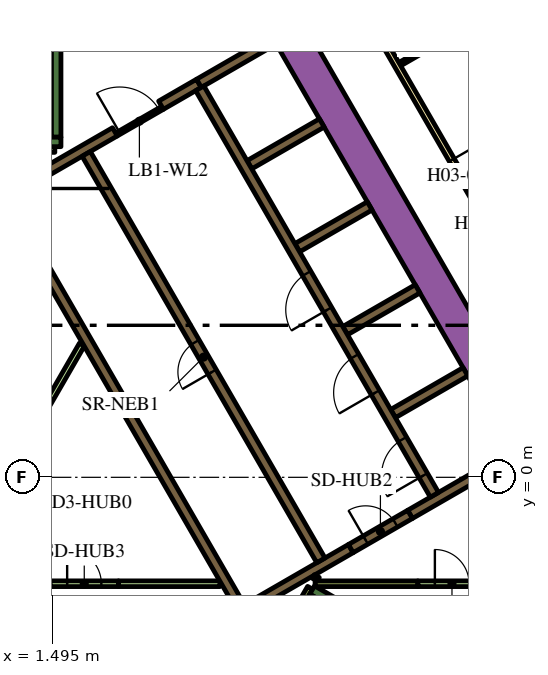
"""IFC4 building model, lengths in metres.
Left out: names, types, materials, properties, quantities, classifications, styles, units other than length and angle.
Written with IfcOpenShell. Run it as: python <this file> out.ifc"""

import sys

from ifc_helpers import new_model, si_unit, direction, frame, frame_2d, origin, place, context, subcontext, project, spatial, polyline, rectangle, outline, extrude, element, fill, save


model = new_model("IFC4")
c1 = context("Model", 3, precision=1e-05, world=origin(), true_north=direction((0.0, 1.0)))
c2 = subcontext(c1, "Body", "Model", "MODEL_VIEW")
j1 = project(units=[si_unit("LENGTHUNIT", "METRE"), si_unit("PLANEANGLEUNIT", "RADIAN")], contexts=[c1])
p1 = place(None, origin())
s1 = spatial("IfcSite", under=j1, at=p1, CompositionType="ELEMENT")
p2 = place(p1, origin())
s2 = spatial("IfcBuilding", under=s1, at=p2, CompositionType="ELEMENT")
p3 = place(p2, frame((0.0, 0.0, 58.8)))
s3 = spatial("IfcBuildingStorey", under=s2, at=p3, CompositionType="ELEMENT", Elevation=58.8)
p4 = place(p3, frame((6.776, 13.364, 0.0), z_axis=(0.0, 0.0, 1.0), x_axis=(0.500004177138, -0.8660229921, 0.0)))
e1 = element("IfcWall", 1, at=p4, inside=s3, PredefinedType="SOLIDWALL", context=c2, shape_type="SweptSolid", body=[
    extrude(rectangle(XDim=20.204, YDim=0.9, at=frame_2d((10.102, 0.0))), origin(), (0.0, 0.0, 1.0), 3.9),
])
p5 = place(p3, frame((8.334, -2.964, 0.0), z_axis=(0.0, 0.0, 1.0), x_axis=(0.866016039709, -0.500016218704, 0.0)))
e2 = element("IfcWall", 2, at=p5, inside=s3, PredefinedType="SOLIDWALL", context=c2, shape_type="SweptSolid", body=[
    extrude(rectangle(XDim=7.05, YDim=0.25, at=frame_2d((3.525, 0.0))), origin(), (0.0, 0.0, 1.0), 3.9),
])
p6 = place(p3, frame((8.163, -3.511, 0.0), z_axis=(0.0, 0.0, 1.0), x_axis=(0.500127794843, 0.865951608824, 0.0)))
e3 = element("IfcWall", 3, at=p6, inside=s3, PredefinedType="SOLIDWALL", context=c2, shape_type="SweptSolid", body=[
    extrude(rectangle(XDim=0.435, YDim=0.25, at=frame_2d((0.217, 0.0))), origin(), (0.0, 0.0, 1.0), 3.9),
])
p7 = place(p3, frame((1.6, 8.95, 0.0), z_axis=(0.0, 0.0, 1.0), x_axis=(0.0, 1.0, 0.0)))
e4 = element("IfcWall", 4, at=p7, inside=s3, PredefinedType="SOLIDWALL", context=c2, shape_type="SweptSolid", body=[
    extrude(rectangle(XDim=6.8, YDim=0.25, at=frame_2d((3.4, 0.0))), origin(), (0.0, 0.0, 1.0), 3.9),
])
p8 = place(p3, frame((1.05, 8.825, 0.0), z_axis=(0.0, 0.0, 1.0), x_axis=(1.0, 0.0, 0.0)))
e5 = element("IfcWall", 5, at=p8, inside=s3, PredefinedType="SOLIDWALL", context=c2, shape_type="SweptSolid", body=[
    extrude(rectangle(XDim=0.675, YDim=0.25, at=frame_2d((0.337, 0.0))), origin(), (0.0, 0.0, 1.0), 3.9),
])
p9 = place(p3, frame((10.464, 1.677, 0.0), z_axis=(0.0, 0.0, 1.0), x_axis=(0.86605622881, 0.499946605688, 0.0)))
e6 = element("IfcWall", 6, at=p9, inside=s3, PredefinedType="SOLIDWALL", context=c2, shape_type="SweptSolid", body=[
    extrude(rectangle(XDim=2.2, YDim=0.25, at=frame_2d((1.1, 0.0))), origin(), (0.0, 0.0, 1.0), 3.9),
])
p10 = place(p3, origin())
e7 = element("IfcWall", 7, at=p10, inside=s3, PredefinedType="SOLIDWALL", context=c2, shape_type="SweptSolid", body=[
    extrude(outline(polyline([(0.335, 6.925), (0.335, 6.925), (0.335, 7.075), (0.335, 7.075), (0.335, 7.075), (0.245, 7.075), (0.079, 7.363), (0.035, 7.439), (0.252, 7.564), (0.377, 7.348), (6.552, -3.348), (6.677, -3.564), (6.46, -3.689), (4.897, -0.981), (0.332, 6.925), (0.335, 6.925), (0.335, 6.925)])), origin(), (0.0, 0.0, 1.0), 3.9),
])
p11 = place(p3, frame((4.358, 9.791, 0.0), z_axis=(0.0, 0.0, 1.0), x_axis=(0.866079547155, 0.499906209203, 0.0)))
e8 = element("IfcWall", 8, at=p11, inside=s3, PredefinedType="SOLIDWALL", context=c2, shape_type="SweptSolid", body=[
    extrude(rectangle(XDim=1.15, YDim=0.25, at=frame_2d((0.575, 0.0))), origin(), (0.0, 0.0, 1.0), 3.9),
])
p12 = place(p3, frame((5.356, 10.367, 0.0), z_axis=(0.0, 0.0, 1.0), x_axis=(0.865978535641, 0.50008116922, 0.0)))
e9 = element("IfcWall", 9, at=p12, inside=s3, PredefinedType="SOLIDWALL", context=c2, shape_type="SweptSolid", body=[
    extrude(rectangle(XDim=2.278, YDim=0.25, at=frame_2d((1.139, 0.0))), origin(), (0.0, 0.0, 1.0), 3.9),
])
p13 = place(p3, frame((0.314, 7.456, 0.0), z_axis=(0.0, 0.0, 1.0), x_axis=(0.866013897511, 0.50001992892, 0.0)))
e10 = element("IfcWall", 10, at=p13, inside=s3, PredefinedType="SOLIDWALL", context=c2, shape_type="SweptSolid", body=[
    extrude(rectangle(XDim=3.268, YDim=0.25, at=frame_2d((1.634, 0.0))), origin(), (0.0, 0.0, 1.0), 3.9),
])
p14 = place(p3, frame((9.352, -1.875, 0.0), z_axis=(0.0, 0.0, 1.0), x_axis=(-0.866024844342, -0.500000968981, 0.0)))
e11 = element("IfcWall", 11, at=p14, inside=s3, PredefinedType="SOLIDWALL", context=c2, shape_type="SweptSolid", body=[
    extrude(rectangle(XDim=3.162, YDim=0.25, at=frame_2d((1.581, 0.0))), origin(), (0.0, 0.0, 1.0), 3.9),
])
for number, where, z_axis, x_axis in (
    (12, (6.684, 8.224, 0.0), (0.0, 0.0, 1.0), (0.866, 0.5, 0.0)),
    (13, (7.944, 6.041, 0.0), (0.0, 0.0, 1.0), (0.866, 0.5, 0.0)),
    (14, (9.204, 3.859, 0.0), (0.0, 0.0, 1.0), (0.866, 0.5, 0.0)),
):
    element("IfcWall", number, at=place(p3, frame(where, z_axis=z_axis, x_axis=x_axis)), inside=s3, PredefinedType="SOLIDWALL", context=c2, shape_type="SweptSolid", body=[
        extrude(rectangle(XDim=2.2, YDim=0.25, at=frame_2d((1.1, 0.0))), origin(), (0.0, 0.0, 1.0), 3.9),
    ])
p15 = place(p3, frame((10.911, -0.975, 0.0), z_axis=(0.0, 0.0, 1.0), x_axis=(0.866046979468, 0.499962627957, 0.0)))
e15 = element("IfcWall", 15, at=p15, inside=s3, PredefinedType="SOLIDWALL", context=c2, shape_type="SweptSolid", body=[
    extrude(rectangle(XDim=3.138, YDim=0.25, at=frame_2d((1.569, 0.0))), origin(), (0.0, 0.0, 1.0), 3.9),
])
p16 = place(p3, frame((8.412, -2.8, 0.0), z_axis=(0.0, 0.0, 1.0), x_axis=(1.0, 0.0, 0.0)))
e16 = element("IfcWall", 16, at=p16, inside=s3, PredefinedType="PARTITIONING", context=c2, shape_type="SweptSolid", body=[
    extrude(rectangle(XDim=2.702, YDim=0.15, at=frame_2d((1.351, 0.0))), origin(), (0.0, 0.0, 1.0), 3.9),
])
p17 = place(p3, frame((8.459, -2.599, 0.0), z_axis=(0.0, 0.0, 1.0), x_axis=(-0.501919277433, -0.864914469148, 0.0)))
e17 = element("IfcWall", 17, at=p17, inside=s3, PredefinedType="PARTITIONING", context=c2, shape_type="SweptSolid", body=[
    extrude(rectangle(XDim=0.109, YDim=0.15, at=frame_2d((0.054, 0.0))), origin(), (0.0, 0.0, 1.0), 3.9),
])
p18 = place(p3, frame((8.281, -2.907, 0.0), z_axis=(0.0, 0.0, 1.0), x_axis=(-0.500193841991, -0.86591346013, 0.0)))
e18 = element("IfcWall", 18, at=p18, inside=s3, PredefinedType="PARTITIONING", context=c2, shape_type="SweptSolid", body=[
    extrude(rectangle(XDim=0.583, YDim=0.15, at=frame_2d((0.292, 0.0))), origin(), (0.0, 0.0, 1.0), 3.9),
])
p19 = place(p3, frame((3.238, -2.8, 0.0), z_axis=(0.0, 0.0, 1.0), x_axis=(1.0, 0.0, 0.0)))
e19 = element("IfcWall", 19, at=p19, inside=s3, PredefinedType="PARTITIONING", context=c2, shape_type="SweptSolid", body=[
    extrude(rectangle(XDim=2.672, YDim=0.15, at=frame_2d((1.336, 0.0))), origin(), (0.0, 0.0, 1.0), 2.75),
])
p20 = place(p3, frame((1.016, 1.309, 0.0), z_axis=(0.0, 0.0, 1.0), x_axis=(0.49998231768, 0.866035612436, 0.0)))
e20 = element("IfcWall", 20, at=p20, inside=s3, PredefinedType="PARTITIONING", context=c2, shape_type="SweptSolid", body=[
    extrude(rectangle(XDim=2.521, YDim=0.15, at=frame_2d((1.26, 0.0))), origin(), (0.0, 0.0, 1.0), 2.75),
])
p21 = place(p3, frame((1.05, 8.625, 0.0), z_axis=(0.0, 0.0, 1.0), x_axis=(1.0, 0.0, 0.0)))
e21 = element("IfcWall", 21, at=p21, inside=s3, PredefinedType="PARTITIONING", context=c2, shape_type="SweptSolid", body=[
    extrude(rectangle(XDim=0.514, YDim=0.15, at=frame_2d((0.257, 0.0))), origin(), (0.0, 0.0, 1.0), 2.75),
])
p22 = place(p3, frame((11.553, -0.46, 0.0), z_axis=(0.0, 0.0, 1.0), x_axis=(-0.500006514828, 0.866021642414, 0.0)))
e22 = element("IfcWall", 22, at=p22, inside=s3, PredefinedType="SOLIDWALL", context=c2, shape_type="SweptSolid", body=[
    extrude(rectangle(XDim=12.35, YDim=0.25, at=frame_2d((6.175, 0.0))), origin(), (0.0, 0.0, 1.0), 3.9),
])
p23 = place(p22, frame((0.585, 0.0, 0.0)))
e23 = element("IfcOpeningElement", 23, at=p23, cuts=e22, PredefinedType="OPENING", context=c2, shape_type="SweptSolid", body=[
    extrude(rectangle(XDim=1.1, YDim=2.1, at=frame_2d((0.55, 1.05))), frame((0.0, 0.135, 0.0), z_axis=(0.0, -1.0, 0.0), x_axis=(1.0, 0.0, 0.0)), (0.0, 0.0, 1.0), 0.27),
])
p24 = place(p22, frame((3.105, 0.0, 0.0)))
e24 = element("IfcOpeningElement", 24, at=p24, cuts=e22, PredefinedType="OPENING", context=c2, shape_type="SweptSolid", body=[
    extrude(rectangle(XDim=1.1, YDim=2.1, at=frame_2d((0.55, 1.05))), frame((0.0, 0.135, 0.0), z_axis=(0.0, -1.0, 0.0), x_axis=(1.0, 0.0, 0.0)), (0.0, 0.0, 1.0), 0.27),
])
p25 = place(p22, frame((5.625, 0.0, 0.0)))
e25 = element("IfcOpeningElement", 25, at=p25, cuts=e22, PredefinedType="OPENING", context=c2, shape_type="SweptSolid", body=[
    extrude(rectangle(XDim=1.1, YDim=2.1, at=frame_2d((0.55, 1.05))), frame((0.0, 0.135, 0.0), z_axis=(0.0, -1.0, 0.0), x_axis=(1.0, 0.0, 0.0)), (0.0, 0.0, 1.0), 0.27),
])
p26 = place(p3, frame((8.565, -2.185, 0.0), z_axis=(0.0, 0.0, 1.0), x_axis=(-0.499997954832, 0.866026584559, 0.0)))
e26 = element("IfcWall", 26, at=p26, inside=s3, PredefinedType="SOLIDWALL", context=c2, shape_type="SweptSolid", body=[
    extrude(rectangle(XDim=12.35, YDim=0.25, at=frame_2d((6.175, 0.0))), origin(), (0.0, 0.0, 1.0), 3.9),
])
p27 = place(p26, frame((5.725, 0.0, 0.0)))
e27 = element("IfcOpeningElement", 27, at=p27, cuts=e26, PredefinedType="OPENING", context=c2, shape_type="SweptSolid", body=[
    extrude(rectangle(XDim=0.9, YDim=2.1, at=frame_2d((0.45, 1.05))), frame((0.0, 0.135, 0.0), z_axis=(0.0, -1.0, 0.0), x_axis=(1.0, 0.0, 0.0)), (0.0, 0.0, 1.0), 0.27),
])
p28 = place(p3, frame((3.183, 9.02, 0.0), z_axis=(0.0, 0.0, 1.0), x_axis=(0.866034573852, 0.49998411664, 0.0)))
e28 = element("IfcWall", 28, at=p28, inside=s3, PredefinedType="PARTITIONING", context=c2, shape_type="SweptSolid", body=[
    extrude(rectangle(XDim=1.4, YDim=0.09, at=frame_2d((0.7, 0.0))), origin(), (0.0, 0.0, 1.0), 2.75),
])
p29 = place(p28, frame((0.1, 0.0, 0.0)))
e29 = element("IfcOpeningElement", 29, at=p29, cuts=e28, PredefinedType="OPENING", context=c2, shape_type="SweptSolid", body=[
    extrude(rectangle(XDim=1.2, YDim=2.1, at=frame_2d((0.6, 1.05))), frame((0.0, 0.055, 0.0), z_axis=(0.0, -1.0, 0.0), x_axis=(1.0, 0.0, 0.0)), (0.0, 0.0, 1.0), 0.11),
])
p30 = place(p3, frame((9.352, -1.875, 0.0), z_axis=(0.0, 0.0, 1.0), x_axis=(0.865989075817, 0.500062916607, 0.0)))
e30 = element("IfcWall", 30, at=p30, inside=s3, PredefinedType="SOLIDWALL", context=c2, shape_type="SweptSolid", body=[
    extrude(rectangle(XDim=1.8, YDim=0.25, at=frame_2d((0.9, 0.0))), origin(), (0.0, 0.0, 1.0), 3.9),
])
p31 = place(p30, frame((0.45, 0.0, 0.0)))
e31 = element("IfcOpeningElement", 31, at=p31, cuts=e30, PredefinedType="OPENING", context=c2, shape_type="SweptSolid", body=[
    extrude(rectangle(XDim=0.9, YDim=2.1, at=frame_2d((0.45, 1.05))), frame((0.0, 0.135, 0.0), z_axis=(0.0, -1.0, 0.0), x_axis=(1.0, 0.0, 0.0)), (0.0, 0.0, 1.0), 0.27),
])
p32 = place(p3, frame((1.438, -2.8, 0.0), z_axis=(0.0, 0.0, 1.0), x_axis=(1.0, 0.0, 0.0)))
e32 = element("IfcWall", 32, at=p32, inside=s3, PredefinedType="PARTITIONING", context=c2, shape_type="SweptSolid", body=[
    extrude(rectangle(XDim=1.8, YDim=0.15, at=frame_2d((0.9, 0.0))), origin(), (0.0, 0.0, 1.0), 2.75),
])
p33 = place(p32, frame((0.45, 0.0, 0.0)))
e33 = element("IfcOpeningElement", 33, at=p33, cuts=e32, PredefinedType="OPENING", context=c2, shape_type="SweptSolid", body=[
    extrude(rectangle(XDim=0.9, YDim=2.1, at=frame_2d((0.45, 1.05))), frame((0.0, 0.085, 0.0), z_axis=(0.0, -1.0, 0.0), x_axis=(1.0, 0.0, 0.0)), (0.0, 0.0, 1.0), 0.17),
])
p34 = place(p3, frame((11.115, -2.8, 0.0), z_axis=(0.0, 0.0, 1.0), x_axis=(1.0, 0.0, 0.0)))
e34 = element("IfcWall", 34, at=p34, inside=s3, PredefinedType="PARTITIONING", context=c2, shape_type="SweptSolid", body=[
    extrude(rectangle(XDim=1.8, YDim=0.15, at=frame_2d((0.9, 0.0))), origin(), (0.0, 0.0, 1.0), 2.75),
])
p35 = place(p34, frame((0.45, 0.0, 0.0)))
e35 = element("IfcOpeningElement", 35, at=p35, cuts=e34, PredefinedType="OPENING", context=c2, shape_type="SweptSolid", body=[
    extrude(rectangle(XDim=0.9, YDim=2.1, at=frame_2d((0.45, 1.05))), frame((0.0, 0.085, 0.0), z_axis=(0.0, -1.0, 0.0), x_axis=(1.0, 0.0, 0.0)), (0.0, 0.0, 1.0), 0.17),
])
p36 = place(p3, frame((6.163, 18.475, 0.0), z_axis=(0.0, 0.0, 1.0), x_axis=(0.500001317485, -0.866024643133, 0.0)))
e36 = element("IfcWall", 36, at=p36, inside=s3, PredefinedType="PARTITIONING", context=c2, shape_type="SweptSolid", body=[
    extrude(rectangle(XDim=25.767, YDim=0.15, at=frame_2d((12.883, 0.0))), origin(), (0.0, 0.0, 1.0), 2.75),
])
p37 = place(p36, frame((24.586, 0.0, 0.0)))
e37 = element("IfcOpeningElement", 37, at=p37, cuts=e36, PredefinedType="OPENING", context=c2, shape_type="SweptSolid", body=[
    extrude(rectangle(XDim=1.0, YDim=2.1, at=frame_2d((0.5, 1.05))), frame((0.0, 0.085, 0.0), z_axis=(0.0, -1.0, 0.0), x_axis=(1.0, 0.0, 0.0)), (0.0, 0.0, 1.0), 0.17),
])
p38 = place(p36, frame((13.144, 0.0, 0.0)))
e38 = element("IfcOpeningElement", 38, at=p38, cuts=e36, PredefinedType="OPENING", context=c2, shape_type="SweptSolid", body=[
    extrude(rectangle(XDim=1.0, YDim=2.1, at=frame_2d((0.5, 1.05))), frame((0.0, 0.085, 0.0), z_axis=(0.0, -1.0, 0.0), x_axis=(1.0, 0.0, 0.0)), (0.0, 0.0, 1.0), 0.17),
])
p39 = place(p36, frame((11.692, 0.0, 0.0)))
e39 = element("IfcOpeningElement", 39, at=p39, cuts=e36, PredefinedType="OPENING", context=c2, shape_type="SweptSolid", body=[
    extrude(rectangle(XDim=1.0, YDim=2.1, at=frame_2d((0.5, 1.05))), frame((0.0, 0.085, 0.0), z_axis=(0.0, -1.0, 0.0), x_axis=(1.0, 0.0, 0.0)), (0.0, 0.0, 1.0), 0.17),
])
p40 = place(p36, frame((0.572, 0.0, 0.0)))
e40 = element("IfcOpeningElement", 40, at=p40, cuts=e36, PredefinedType="OPENING", context=c2, shape_type="SweptSolid", body=[
    extrude(rectangle(XDim=1.0, YDim=2.1, at=frame_2d((0.5, 1.05))), frame((0.0, 0.085, 0.0), z_axis=(0.0, -1.0, 0.0), x_axis=(1.0, 0.0, 0.0)), (0.0, 0.0, 1.0), 0.17),
])
p41 = place(p3, frame((10.64, 10.871, 0.0), z_axis=(0.0, 0.0, 1.0), x_axis=(0.866036505625, 0.499980770555, 0.0)))
e41 = element("IfcWall", 41, at=p41, inside=s3, PredefinedType="PARTITIONING", context=c2, shape_type="SweptSolid", body=[
    extrude(rectangle(XDim=2.7, YDim=0.1, at=frame_2d((1.35, 0.0))), origin(), (0.0, 0.0, 1.0), 2.75),
])
p42 = place(p41, frame((0.6, 0.0, 0.0)))
e42 = element("IfcOpeningElement", 42, at=p42, cuts=e41, PredefinedType="OPENING", context=c2, shape_type="SweptSolid", body=[
    extrude(rectangle(XDim=0.9, YDim=2.1, at=frame_2d((0.45, 1.05))), frame((0.0, 0.06, 0.0), z_axis=(0.0, -1.0, 0.0), x_axis=(1.0, 0.0, 0.0)), (0.0, 0.0, 1.0), 0.12),
])
p43 = place(p23, origin())
e43 = element("IfcDoor", 43, at=p43, inside=s3, OperationType="DOUBLE_DOOR_SLIDING", PredefinedType="DOOR", context=c2, shape_type="SweptSolid", body=[
    extrude(rectangle(XDim=1.1, YDim=2.1, at=frame_2d((0.55, 1.05))), frame((0.0, 0.025, 0.0), z_axis=(0.0, -1.0, 0.0), x_axis=(1.0, 0.0, 0.0)), (0.0, 0.0, 1.0), 0.05),
])
fill(e23, e43)
p44 = place(p24, origin())
e44 = element("IfcDoor", 44, at=p44, inside=s3, OperationType="DOUBLE_DOOR_SLIDING", PredefinedType="DOOR", context=c2, shape_type="SweptSolid", body=[
    extrude(rectangle(XDim=1.1, YDim=2.1, at=frame_2d((0.55, 1.05))), frame((0.0, 0.025, 0.0), z_axis=(0.0, -1.0, 0.0), x_axis=(1.0, 0.0, 0.0)), (0.0, 0.0, 1.0), 0.05),
])
fill(e24, e44)
p45 = place(p25, origin())
e45 = element("IfcDoor", 45, at=p45, inside=s3, OperationType="DOUBLE_DOOR_SLIDING", PredefinedType="DOOR", context=c2, shape_type="SweptSolid", body=[
    extrude(rectangle(XDim=1.1, YDim=2.1, at=frame_2d((0.55, 1.05))), frame((0.0, 0.025, 0.0), z_axis=(0.0, -1.0, 0.0), x_axis=(1.0, 0.0, 0.0)), (0.0, 0.0, 1.0), 0.05),
])
fill(e25, e45)
p46 = place(p27, origin())
e46 = element("IfcDoor", 46, at=p46, inside=s3, OperationType="SINGLE_SWING_LEFT", PredefinedType="DOOR", context=c2, shape_type="SweptSolid", body=[
    extrude(rectangle(XDim=0.9, YDim=2.1, at=frame_2d((0.45, 1.05))), frame((0.0, 0.025, 0.0), z_axis=(0.0, -1.0, 0.0), x_axis=(1.0, 0.0, 0.0)), (0.0, 0.0, 1.0), 0.05),
])
fill(e27, e46)
p47 = place(p29, origin())
e47 = element("IfcDoor", 47, at=p47, inside=s3, OperationType="SINGLE_SWING_LEFT", PredefinedType="DOOR", context=c2, shape_type="SweptSolid", body=[
    extrude(rectangle(XDim=1.2, YDim=2.1, at=frame_2d((0.6, 1.05))), frame((0.0, 0.025, 0.0), z_axis=(0.0, -1.0, 0.0), x_axis=(1.0, 0.0, 0.0)), (0.0, 0.0, 1.0), 0.05),
])
fill(e29, e47)
p48 = place(p31, origin())
e48 = element("IfcDoor", 48, at=p48, inside=s3, OperationType="SINGLE_SWING_LEFT", PredefinedType="DOOR", context=c2, shape_type="SweptSolid", body=[
    extrude(rectangle(XDim=0.9, YDim=2.1, at=frame_2d((0.45, 1.05))), frame((0.0, 0.025, 0.0), z_axis=(0.0, -1.0, 0.0), x_axis=(1.0, 0.0, 0.0)), (0.0, 0.0, 1.0), 0.05),
])
fill(e31, e48)
p49 = place(p33, origin())
e49 = element("IfcDoor", 49, at=p49, inside=s3, OperationType="SINGLE_SWING_LEFT", PredefinedType="DOOR", context=c2, shape_type="SweptSolid", body=[
    extrude(rectangle(XDim=0.9, YDim=2.1, at=frame_2d((0.45, 1.05))), frame((0.0, 0.025, 0.0), z_axis=(0.0, -1.0, 0.0), x_axis=(1.0, 0.0, 0.0)), (0.0, 0.0, 1.0), 0.05),
])
fill(e33, e49)
p50 = place(p35, origin())
e50 = element("IfcDoor", 50, at=p50, inside=s3, OperationType="SINGLE_SWING_LEFT", PredefinedType="DOOR", context=c2, shape_type="SweptSolid", body=[
    extrude(rectangle(XDim=0.9, YDim=2.1, at=frame_2d((0.45, 1.05))), frame((0.0, 0.025, 0.0), z_axis=(0.0, -1.0, 0.0), x_axis=(1.0, 0.0, 0.0)), (0.0, 0.0, 1.0), 0.05),
])
fill(e35, e50)
p51 = place(p39, origin())
e51 = element("IfcDoor", 51, at=p51, inside=s3, OperationType="SINGLE_SWING_RIGHT", PredefinedType="DOOR", context=c2, shape_type="SweptSolid", body=[
    extrude(rectangle(XDim=1.0, YDim=2.1, at=frame_2d((0.5, 1.05))), frame((0.0, 0.025, 0.0), z_axis=(0.0, -1.0, 0.0), x_axis=(1.0, 0.0, 0.0)), (0.0, 0.0, 1.0), 0.05),
])
fill(e39, e51)
p52 = place(p42, origin())
e52 = element("IfcDoor", 52, at=p52, inside=s3, OperationType="SINGLE_SWING_LEFT", PredefinedType="DOOR", context=c2, shape_type="SweptSolid", body=[
    extrude(rectangle(XDim=0.9, YDim=2.1, at=frame_2d((0.45, 1.05))), frame((0.0, 0.025, 0.0), z_axis=(0.0, -1.0, 0.0), x_axis=(1.0, 0.0, 0.0)), (0.0, 0.0, 1.0), 0.05),
])
fill(e42, e52)
save(model, sys.argv[1])
